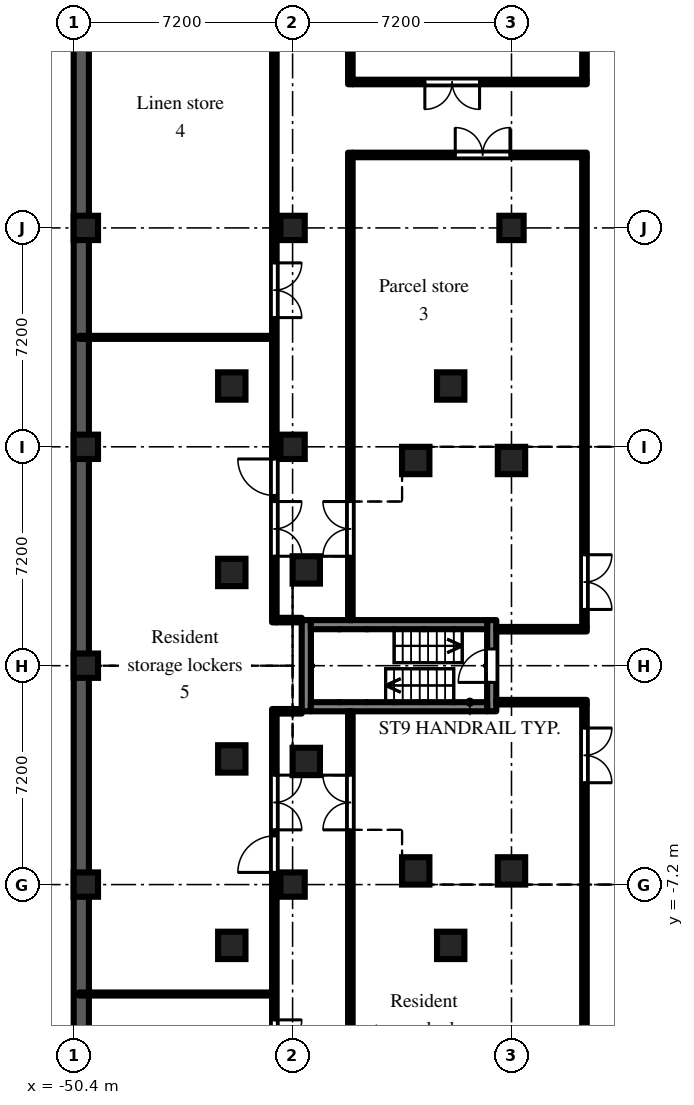
"""IFC4 building model, lengths in metres.
Left out: names, types, materials, properties, quantities, classifications, styles, units other than length and angle.
Written with IfcOpenShell. Run it as: python <this file> out.ifc"""

import sys

from ifc_helpers import new_model, si_unit, direction, frame, frame_2d, origin, origin_2d, place, context, subcontext, project, spatial, rectangle, extrude, element, fill, save


model = new_model("IFC4")
c1 = context("Model", 3, precision=1e-05, world=origin(), true_north=direction((0.0, 1.0)))
c2 = subcontext(c1, "Body", "Model", "MODEL_VIEW")
j1 = project(units=[si_unit("LENGTHUNIT", "METRE"), si_unit("PLANEANGLEUNIT", "RADIAN")], contexts=[c1])
p1 = place(None, origin())
s1 = spatial("IfcSite", under=j1, at=p1, CompositionType="ELEMENT")
p2 = place(p1, origin())
s2 = spatial("IfcBuilding", under=s1, at=p2, CompositionType="ELEMENT")
p3 = place(p2, frame((0.0, 0.0, -4.8)))
s3 = spatial("IfcBuildingStorey", under=s2, at=p3, CompositionType="ELEMENT", Elevation=-4.8)
p4 = place(p3, frame((-50.15, -49.9, -0.5), z_axis=(0.0, 0.0, 1.0), x_axis=(0.0, 1.0, 0.0)))
e1 = element("IfcWall", 1, at=p4, inside=s3, PredefinedType="SOLIDWALL", context=c2, shape_type="SweptSolid", body=[
    extrude(rectangle(XDim=99.8, YDim=0.5, at=frame_2d((49.9, 0.0))), origin(), (0.0, 0.0, 1.0), 5.3),
])
for number, where, z_axis, x_axis in (
    (2, (-42.75, -3.15, -0.5), (0.0, 0.0, 1.0), (1.0, 0.0, 0.0)),
    (3, (-42.75, 3.15, -0.5), (0.0, 0.0, 1.0), (1.0, 0.0, 0.0)),
    (4, (-39.15, -6.75, -0.5), (0.0, 0.0, 1.0), (1.0, 0.0, 0.0)),
    (5, (-39.15, 6.75, -0.5), (0.0, 0.0, 1.0), (1.0, 0.0, 0.0)),
    (6, (-36.0, -6.75, -0.5), (0.0, 0.0, 1.0), (1.0, 0.0, 0.0)),
    (7, (-36.0, 6.75, -0.5), (0.0, 0.0, 1.0), (1.0, 0.0, 0.0)),
):
    element("IfcColumn", number, at=place(p3, frame(where, z_axis=z_axis, x_axis=x_axis)), inside=s3, PredefinedType="COLUMN", context=c2, shape_type="SweptSolid", body=[
        extrude(rectangle(XDim=0.9, YDim=0.9, at=origin_2d()), origin(), (0.0, 0.0, 1.0), 5.3),
    ])
for number, where, z_axis, x_axis in (
    (8, (-50.0, -7.2, -0.5), (0.0, 0.0, 1.0), (1.0, 0.0, 0.0)),
    (9, (-50.0, 0.0, -0.5), (0.0, 0.0, 1.0), (1.0, 0.0, 0.0)),
    (10, (-50.0, 7.2, -0.5), (0.0, 0.0, 1.0), (1.0, 0.0, 0.0)),
    (11, (-50.0, 14.4, -0.5), (0.0, 0.0, 1.0), (1.0, 0.0, 0.0)),
    (12, (-43.2, -7.2, -0.5), (0.0, 0.0, 1.0), (1.0, 0.0, 0.0)),
    (13, (-43.2, 7.2, -0.5), (0.0, 0.0, 1.0), (1.0, 0.0, 0.0)),
    (14, (-43.2, 14.4, -0.5), (0.0, 0.0, 1.0), (1.0, 0.0, 0.0)),
    (15, (-36.0, 14.4, -0.5), (0.0, 0.0, 1.0), (1.0, 0.0, 0.0)),
):
    element("IfcColumn", number, at=place(p3, frame(where, z_axis=z_axis, x_axis=x_axis)), inside=s3, PredefinedType="COLUMN", context=c2, shape_type="SweptSolid", body=[
        extrude(rectangle(XDim=0.8, YDim=0.8, at=origin_2d()), origin(), (0.0, 0.0, 1.0), 5.3),
    ])
for number, where, z_axis, x_axis in (
    (16, (-45.2, -9.2, -0.5), (0.0, 0.0, 1.0), (1.0, 0.0, 0.0)),
    (17, (-45.2, -3.067, -0.5), (0.0, 0.0, 1.0), (1.0, 0.0, 0.0)),
    (18, (-45.2, 3.067, -0.5), (0.0, 0.0, 1.0), (1.0, 0.0, 0.0)),
    (19, (-45.2, 9.2, -0.5), (0.0, 0.0, 1.0), (1.0, 0.0, 0.0)),
    (20, (-38.0, -9.2, -0.5), (0.0, 0.0, 1.0), (1.0, 0.0, 0.0)),
    (21, (-38.0, 9.2, -0.5), (0.0, 0.0, 1.0), (1.0, 0.0, 0.0)),
):
    element("IfcColumn", number, at=place(p3, frame(where, z_axis=z_axis, x_axis=x_axis)), inside=s3, PredefinedType="COLUMN", context=c2, shape_type="SweptSolid", body=[
        extrude(rectangle(XDim=0.9, YDim=0.9, at=origin_2d()), origin(), (0.0, 0.0, 1.0), 5.3),
    ])
p5 = place(p3, frame((-36.65, -1.5, 0.0), z_axis=(0.0, 0.0, 1.0), x_axis=(0.0, 1.0, 0.0)))
e22 = element("IfcWall", 22, at=p5, inside=s3, PredefinedType="SHEAR", context=c2, shape_type="SweptSolid", body=[
    extrude(rectangle(XDim=3.0, YDim=0.3, at=frame_2d((1.5, 0.0))), origin(), (0.0, 0.0, 1.0), 4.35),
])
p6 = place(p5, frame((0.95, 0.0, 0.0)))
e23 = element("IfcOpeningElement", 23, at=p6, cuts=e22, PredefinedType="OPENING", context=c2, shape_type="SweptSolid", body=[
    extrude(rectangle(XDim=1.1, YDim=2.1, at=frame_2d((0.55, 1.05))), frame((0.0, 0.16, 0.0), z_axis=(0.0, -1.0, 0.0), x_axis=(1.0, 0.0, 0.0)), (0.0, 0.0, 1.0), 0.32),
])
p7 = place(p3, frame((-42.75, -1.5, 0.0), z_axis=(0.0, 0.0, 1.0), x_axis=(0.0, 1.0, 0.0)))
e24 = element("IfcWall", 24, at=p7, inside=s3, PredefinedType="SHEAR", context=c2, shape_type="SweptSolid", body=[
    extrude(rectangle(XDim=3.0, YDim=0.3, at=frame_2d((1.5, 0.0))), origin(), (0.0, 0.0, 1.0), 4.35),
])
for number, where, z_axis, x_axis in (
    (25, (-36.8, -1.35, 0.0), (0.0, 0.0, 1.0), (-1.0, 0.0, 0.0)),
    (26, (-36.8, 1.35, 0.0), (0.0, 0.0, 1.0), (-1.0, 0.0, 0.0)),
):
    element("IfcWall", number, at=place(p3, frame(where, z_axis=z_axis, x_axis=x_axis)), inside=s3, PredefinedType="SHEAR", context=c2, shape_type="SweptSolid", body=[
        extrude(rectangle(XDim=5.8, YDim=0.3, at=frame_2d((2.9, 0.0))), origin(), (0.0, 0.0, 1.0), 4.35),
    ])
for number, where, z_axis, x_axis in (
    (27, (-50.22, -10.8, 0.0), (0.0, 0.0, 1.0), (1.0, 0.0, 0.0)),
    (28, (-50.22, 10.8, 0.0), (0.0, 0.0, 1.0), (1.0, 0.0, 0.0)),
):
    element("IfcWall", number, at=place(p3, frame(where, z_axis=z_axis, x_axis=x_axis)), inside=s3, PredefinedType="PARTITIONING", context=c2, shape_type="SweptSolid", body=[
        extrude(rectangle(XDim=6.345, YDim=0.1, at=frame_2d((3.172, 0.0))), origin(), (0.0, 0.0, 1.0), 4.35),
    ])
p8 = place(p3, frame((-43.8, -31.275, 0.0), z_axis=(0.0, 0.0, 1.0), x_axis=(0.0, 1.0, 0.0)))
e29 = element("IfcWall", 29, at=p8, inside=s3, PredefinedType="PARTITIONING", context=c2, shape_type="SweptSolid", body=[
    extrude(rectangle(XDim=29.85, YDim=0.15, at=frame_2d((14.925, 0.0))), origin(), (0.0, 0.0, 1.0), 4.35),
])
p9 = place(p8, frame((3.725, 0.0, 0.0)))
e30 = element("IfcOpeningElement", 30, at=p9, cuts=e29, PredefinedType="OPENING", context=c2, shape_type="SweptSolid", body=[
    extrude(rectangle(XDim=1.2, YDim=2.1, at=frame_2d((0.6, 1.05))), frame((0.0, 0.085, 0.0), z_axis=(0.0, -1.0, 0.0), x_axis=(1.0, 0.0, 0.0)), (0.0, 0.0, 1.0), 0.17),
])
p10 = place(p8, frame((24.475, 0.0, 0.0)))
e31 = element("IfcOpeningElement", 31, at=p10, cuts=e29, PredefinedType="OPENING", context=c2, shape_type="SweptSolid", body=[
    extrude(rectangle(XDim=1.2, YDim=2.1, at=frame_2d((0.6, 1.05))), frame((0.0, 0.085, 0.0), z_axis=(0.0, -1.0, 0.0), x_axis=(1.0, 0.0, 0.0)), (0.0, 0.0, 1.0), 0.17),
])
p11 = place(p8, frame((25.875, 0.0, 0.0)))
e32 = element("IfcOpeningElement", 32, at=p11, cuts=e29, PredefinedType="OPENING", context=c2, shape_type="SweptSolid", body=[
    extrude(rectangle(XDim=1.8, YDim=2.1, at=frame_2d((0.9, 1.05))), frame((0.0, 0.085, 0.0), z_axis=(0.0, -1.0, 0.0), x_axis=(1.0, 0.0, 0.0)), (0.0, 0.0, 1.0), 0.17),
])
p12 = place(p8, frame((6.725, 0.0, 0.0)))
e33 = element("IfcOpeningElement", 33, at=p12, cuts=e29, PredefinedType="OPENING", context=c2, shape_type="SweptSolid", body=[
    extrude(rectangle(XDim=1.8, YDim=2.1, at=frame_2d((0.9, 1.05))), frame((0.0, 0.085, 0.0), z_axis=(0.0, -1.0, 0.0), x_axis=(1.0, 0.0, 0.0)), (0.0, 0.0, 1.0), 0.17),
])
p13 = place(p8, frame((17.825, 0.0, 0.0)))
e34 = element("IfcOpeningElement", 34, at=p13, cuts=e29, PredefinedType="OPENING", context=c2, shape_type="SweptSolid", body=[
    extrude(rectangle(XDim=1.8, YDim=2.1, at=frame_2d((0.9, 1.05))), frame((0.0, 0.085, 0.0), z_axis=(0.0, -1.0, 0.0), x_axis=(1.0, 0.0, 0.0)), (0.0, 0.0, 1.0), 0.17),
])
p14 = place(p3, frame((-43.725, -1.5, 0.0), z_axis=(0.0, 0.0, 1.0), x_axis=(1.0, 0.0, 0.0)))
e35 = element("IfcWall", 35, at=p14, inside=s3, PredefinedType="PARTITIONING", context=c2, shape_type="SweptSolid", body=[
    extrude(rectangle(XDim=0.825, YDim=0.15, at=frame_2d((0.413, 0.0))), origin(), (0.0, 0.0, 1.0), 4.35),
])
p15 = place(p3, frame((-43.8, 1.425, 0.0), z_axis=(0.0, 0.0, 1.0), x_axis=(0.0, 1.0, 0.0)))
e36 = element("IfcWall", 36, at=p15, inside=s3, PredefinedType="PARTITIONING", context=c2, shape_type="SweptSolid", body=[
    extrude(rectangle(XDim=29.85, YDim=0.15, at=frame_2d((14.925, 0.0))), origin(), (0.0, 0.0, 1.0), 4.35),
])
p16 = place(p15, frame((24.425, 0.0, 0.0)))
e37 = element("IfcOpeningElement", 37, at=p16, cuts=e36, PredefinedType="OPENING", context=c2, shape_type="SweptSolid", body=[
    extrude(rectangle(XDim=1.8, YDim=2.1, at=frame_2d((0.9, 1.05))), frame((0.0, 0.085, 0.0), z_axis=(0.0, -1.0, 0.0), x_axis=(1.0, 0.0, 0.0)), (0.0, 0.0, 1.0), 0.17),
])
p17 = place(p15, frame((10.025, 0.0, 0.0)))
e38 = element("IfcOpeningElement", 38, at=p17, cuts=e36, PredefinedType="OPENING", context=c2, shape_type="SweptSolid", body=[
    extrude(rectangle(XDim=1.8, YDim=2.1, at=frame_2d((0.9, 1.05))), frame((0.0, 0.085, 0.0), z_axis=(0.0, -1.0, 0.0), x_axis=(1.0, 0.0, 0.0)), (0.0, 0.0, 1.0), 0.17),
])
p18 = place(p15, frame((21.125, 0.0, 0.0)))
e39 = element("IfcOpeningElement", 39, at=p18, cuts=e36, PredefinedType="OPENING", context=c2, shape_type="SweptSolid", body=[
    extrude(rectangle(XDim=1.8, YDim=2.1, at=frame_2d((0.9, 1.05))), frame((0.0, 0.085, 0.0), z_axis=(0.0, -1.0, 0.0), x_axis=(1.0, 0.0, 0.0)), (0.0, 0.0, 1.0), 0.17),
])
p19 = place(p15, frame((2.175, 0.0, 0.0)))
e40 = element("IfcOpeningElement", 40, at=p19, cuts=e36, PredefinedType="OPENING", context=c2, shape_type="SweptSolid", body=[
    extrude(rectangle(XDim=1.8, YDim=2.1, at=frame_2d((0.9, 1.05))), frame((0.0, 0.085, 0.0), z_axis=(0.0, -1.0, 0.0), x_axis=(1.0, 0.0, 0.0)), (0.0, 0.0, 1.0), 0.17),
])
p20 = place(p15, frame((4.175, 0.0, 0.0)))
e41 = element("IfcOpeningElement", 41, at=p20, cuts=e36, PredefinedType="OPENING", context=c2, shape_type="SweptSolid", body=[
    extrude(rectangle(XDim=1.2, YDim=2.1, at=frame_2d((0.6, 1.05))), frame((0.0, 0.085, 0.0), z_axis=(0.0, -1.0, 0.0), x_axis=(1.0, 0.0, 0.0)), (0.0, 0.0, 1.0), 0.17),
])
p21 = place(p3, frame((-43.725, 1.5, 0.0), z_axis=(0.0, 0.0, 1.0), x_axis=(1.0, 0.0, 0.0)))
e42 = element("IfcWall", 42, at=p21, inside=s3, PredefinedType="PARTITIONING", context=c2, shape_type="SweptSolid", body=[
    extrude(rectangle(XDim=0.825, YDim=0.15, at=frame_2d((0.413, 0.0))), origin(), (0.0, 0.0, 1.0), 4.35),
])
p22 = place(p3, frame((-41.3, -16.875, 0.0), z_axis=(0.0, 0.0, 1.0), x_axis=(0.0, 1.0, 0.0)))
e43 = element("IfcWall", 43, at=p22, inside=s3, PredefinedType="PARTITIONING", context=c2, shape_type="SweptSolid", body=[
    extrude(rectangle(XDim=15.375, YDim=0.15, at=frame_2d((7.688, 0.0))), origin(), (0.0, 0.0, 1.0), 4.35),
])
p23 = place(p22, frame((11.475, 0.0, 0.0)))
e44 = element("IfcOpeningElement", 44, at=p23, cuts=e43, PredefinedType="OPENING", context=c2, shape_type="SweptSolid", body=[
    extrude(rectangle(XDim=1.8, YDim=2.1, at=frame_2d((0.9, 1.05))), frame((0.0, 0.085, 0.0), z_axis=(0.0, -1.0, 0.0), x_axis=(1.0, 0.0, 0.0)), (0.0, 0.0, 1.0), 0.17),
])
p24 = place(p3, frame((-41.3, 1.5, 0.0), z_axis=(0.0, 0.0, 1.0), x_axis=(0.0, 1.0, 0.0)))
e45 = element("IfcWall", 45, at=p24, inside=s3, PredefinedType="PARTITIONING", context=c2, shape_type="SweptSolid", body=[
    extrude(rectangle(XDim=15.375, YDim=0.15, at=frame_2d((7.688, 0.0))), origin(), (0.0, 0.0, 1.0), 4.35),
])
p25 = place(p24, frame((2.1, 0.0, 0.0)))
e46 = element("IfcOpeningElement", 46, at=p25, cuts=e45, PredefinedType="OPENING", context=c2, shape_type="SweptSolid", body=[
    extrude(rectangle(XDim=1.8, YDim=2.1, at=frame_2d((0.9, 1.05))), frame((0.0, 0.085, 0.0), z_axis=(0.0, -1.0, 0.0), x_axis=(1.0, 0.0, 0.0)), (0.0, 0.0, 1.0), 0.17),
])
p26 = place(p3, frame((-41.225, 16.8, 0.0), z_axis=(0.0, 0.0, 1.0), x_axis=(1.0, 0.0, 0.0)))
e47 = element("IfcWall", 47, at=p26, inside=s3, PredefinedType="PARTITIONING", context=c2, shape_type="SweptSolid", body=[
    extrude(rectangle(XDim=7.7, YDim=0.15, at=frame_2d((3.85, 0.0))), origin(), (0.0, 0.0, 1.0), 4.35),
])
p27 = place(p26, frame((3.375, 0.0, 0.0)))
e48 = element("IfcOpeningElement", 48, at=p27, cuts=e47, PredefinedType="OPENING", context=c2, shape_type="SweptSolid", body=[
    extrude(rectangle(XDim=1.8, YDim=2.1, at=frame_2d((0.9, 1.05))), frame((0.0, 0.085, 0.0), z_axis=(0.0, -1.0, 0.0), x_axis=(1.0, 0.0, 0.0)), (0.0, 0.0, 1.0), 0.17),
])
p28 = place(p3, frame((-41.3, 19.125, 0.0), z_axis=(0.0, 0.0, 1.0), x_axis=(0.0, 1.0, 0.0)))
e49 = element("IfcWall", 49, at=p28, inside=s3, PredefinedType="PARTITIONING", context=c2, shape_type="SweptSolid", body=[
    extrude(rectangle(XDim=12.15, YDim=0.15, at=frame_2d((6.075, 0.0))), origin(), (0.0, 0.0, 1.0), 4.35),
])
p29 = place(p3, frame((-41.225, 19.2, 0.0), z_axis=(0.0, 0.0, 1.0), x_axis=(1.0, 0.0, 0.0)))
e50 = element("IfcWall", 50, at=p29, inside=s3, PredefinedType="PARTITIONING", context=c2, shape_type="SweptSolid", body=[
    extrude(rectangle(XDim=7.7, YDim=0.15, at=frame_2d((3.85, 0.0))), origin(), (0.0, 0.0, 1.0), 4.35),
])
p30 = place(p29, frame((2.375, 0.0, 0.0)))
e51 = element("IfcOpeningElement", 51, at=p30, cuts=e50, PredefinedType="OPENING", context=c2, shape_type="SweptSolid", body=[
    extrude(rectangle(XDim=1.8, YDim=2.1, at=frame_2d((0.9, 1.05))), frame((0.0, 0.085, 0.0), z_axis=(0.0, -1.0, 0.0), x_axis=(1.0, 0.0, 0.0)), (0.0, 0.0, 1.0), 0.17),
])
for number, where, z_axis, x_axis in (
    (52, (-36.5, -1.2, 0.0), (0.0, 0.0, 1.0), (1.0, 0.0, 0.0)),
    (53, (-36.5, 1.2, 0.0), (0.0, 0.0, 1.0), (1.0, 0.0, 0.0)),
):
    element("IfcWall", number, at=place(p3, frame(where, z_axis=z_axis, x_axis=x_axis)), inside=s3, PredefinedType="PARTITIONING", context=c2, shape_type="SweptSolid", body=[
        extrude(rectangle(XDim=2.975, YDim=0.15, at=frame_2d((1.488, 0.0))), origin(), (0.0, 0.0, 1.0), 4.35),
    ])
p31 = place(p3, frame((-33.6, -16.725, 0.0), z_axis=(0.0, 0.0, 1.0), x_axis=(0.0, 1.0, 0.0)))
e54 = element("IfcWall", 54, at=p31, inside=s3, PredefinedType="PARTITIONING", context=c2, shape_type="SweptSolid", body=[
    extrude(rectangle(XDim=15.45, YDim=0.15, at=frame_2d((7.725, 0.0))), origin(), (0.0, 0.0, 1.0), 4.35),
])
p32 = place(p31, frame((12.875, 0.0, 0.0)))
e55 = element("IfcOpeningElement", 55, at=p32, cuts=e54, PredefinedType="OPENING", context=c2, shape_type="SweptSolid", body=[
    extrude(rectangle(XDim=1.8, YDim=2.1, at=frame_2d((0.9, 1.05))), frame((0.0, 0.085, 0.0), z_axis=(0.0, -1.0, 0.0), x_axis=(1.0, 0.0, 0.0)), (0.0, 0.0, 1.0), 0.17),
])
p33 = place(p3, frame((-33.6, 1.275, 0.0), z_axis=(0.0, 0.0, 1.0), x_axis=(0.0, 1.0, 0.0)))
e56 = element("IfcWall", 56, at=p33, inside=s3, PredefinedType="PARTITIONING", context=c2, shape_type="SweptSolid", body=[
    extrude(rectangle(XDim=15.45, YDim=0.15, at=frame_2d((7.725, 0.0))), origin(), (0.0, 0.0, 1.0), 4.35),
])
p34 = place(p33, frame((0.575, 0.0, 0.0)))
e57 = element("IfcOpeningElement", 57, at=p34, cuts=e56, PredefinedType="OPENING", context=c2, shape_type="SweptSolid", body=[
    extrude(rectangle(XDim=1.8, YDim=2.1, at=frame_2d((0.9, 1.05))), frame((0.0, 0.085, 0.0), z_axis=(0.0, -1.0, 0.0), x_axis=(1.0, 0.0, 0.0)), (0.0, 0.0, 1.0), 0.17),
])
p35 = place(p3, frame((-33.6, 19.275, 0.0), z_axis=(0.0, 0.0, 1.0), x_axis=(0.0, 1.0, 0.0)))
e58 = element("IfcWall", 58, at=p35, inside=s3, PredefinedType="PARTITIONING", context=c2, shape_type="SweptSolid", body=[
    extrude(rectangle(XDim=11.85, YDim=0.15, at=frame_2d((5.925, 0.0))), origin(), (0.0, 0.0, 1.0), 4.35),
])
p36 = place(p6, origin())
e59 = element("IfcDoor", 59, at=p36, inside=s3, OperationType="SINGLE_SWING_LEFT", PredefinedType="DOOR", context=c2, shape_type="SweptSolid", body=[
    extrude(rectangle(XDim=1.1, YDim=2.1, at=frame_2d((0.55, 1.05))), frame((0.0, 0.025, 0.0), z_axis=(0.0, -1.0, 0.0), x_axis=(1.0, 0.0, 0.0)), (0.0, 0.0, 1.0), 0.05),
])
fill(e23, e59)
p37 = place(p30, frame((1.8, 0.0, 0.0), z_axis=(0.0, 0.0, 1.0), x_axis=(-1.0, 0.0, 0.0)))
e60 = element("IfcDoor", 60, at=p37, inside=s3, OperationType="DOUBLE_DOOR_DOUBLE_SWING", PredefinedType="DOOR", context=c2, shape_type="SweptSolid", body=[
    extrude(rectangle(XDim=1.8, YDim=2.1, at=frame_2d((0.9, 1.05))), frame((0.0, 0.025, 0.0), z_axis=(0.0, -1.0, 0.0), x_axis=(1.0, 0.0, 0.0)), (0.0, 0.0, 1.0), 0.05),
])
fill(e51, e60)
p38 = place(p17, frame((1.8, 0.0, 0.0), z_axis=(0.0, 0.0, 1.0), x_axis=(-1.0, 0.0, 0.0)))
e61 = element("IfcDoor", 61, at=p38, inside=s3, OperationType="DOUBLE_DOOR_DOUBLE_SWING", PredefinedType="DOOR", context=c2, shape_type="SweptSolid", body=[
    extrude(rectangle(XDim=1.8, YDim=2.1, at=frame_2d((0.9, 1.05))), frame((0.0, 0.025, 0.0), z_axis=(0.0, -1.0, 0.0), x_axis=(1.0, 0.0, 0.0)), (0.0, 0.0, 1.0), 0.05),
])
fill(e38, e61)
p39 = place(p25, origin())
e62 = element("IfcDoor", 62, at=p39, inside=s3, OperationType="DOUBLE_DOOR_DOUBLE_SWING", PredefinedType="DOOR", context=c2, shape_type="SweptSolid", body=[
    extrude(rectangle(XDim=1.8, YDim=2.1, at=frame_2d((0.9, 1.05))), frame((0.0, 0.025, 0.0), z_axis=(0.0, -1.0, 0.0), x_axis=(1.0, 0.0, 0.0)), (0.0, 0.0, 1.0), 0.05),
])
fill(e46, e62)
p40 = place(p27, origin())
e63 = element("IfcDoor", 63, at=p40, inside=s3, OperationType="DOUBLE_DOOR_DOUBLE_SWING", PredefinedType="DOOR", context=c2, shape_type="SweptSolid", body=[
    extrude(rectangle(XDim=1.8, YDim=2.1, at=frame_2d((0.9, 1.05))), frame((0.0, 0.025, 0.0), z_axis=(0.0, -1.0, 0.0), x_axis=(1.0, 0.0, 0.0)), (0.0, 0.0, 1.0), 0.05),
])
fill(e48, e63)
p41 = place(p34, frame((1.8, 0.0, 0.0), z_axis=(0.0, 0.0, 1.0), x_axis=(-1.0, 0.0, 0.0)))
e64 = element("IfcDoor", 64, at=p41, inside=s3, OperationType="DOUBLE_DOOR_DOUBLE_SWING", PredefinedType="DOOR", context=c2, shape_type="SweptSolid", body=[
    extrude(rectangle(XDim=1.8, YDim=2.1, at=frame_2d((0.9, 1.05))), frame((0.0, 0.025, 0.0), z_axis=(0.0, -1.0, 0.0), x_axis=(1.0, 0.0, 0.0)), (0.0, 0.0, 1.0), 0.05),
])
fill(e57, e64)
p42 = place(p10, origin())
e65 = element("IfcDoor", 65, at=p42, inside=s3, OperationType="SINGLE_SWING_LEFT", PredefinedType="DOOR", context=c2, shape_type="SweptSolid", body=[
    extrude(rectangle(XDim=1.2, YDim=2.1, at=frame_2d((0.6, 1.05))), frame((0.0, 0.025, 0.0), z_axis=(0.0, -1.0, 0.0), x_axis=(1.0, 0.0, 0.0)), (0.0, 0.0, 1.0), 0.05),
])
fill(e31, e65)
p43 = place(p11, frame((1.8, 0.0, 0.0), z_axis=(0.0, 0.0, 1.0), x_axis=(-1.0, 0.0, 0.0)))
e66 = element("IfcDoor", 66, at=p43, inside=s3, OperationType="DOUBLE_DOOR_DOUBLE_SWING", PredefinedType="DOOR", context=c2, shape_type="SweptSolid", body=[
    extrude(rectangle(XDim=1.8, YDim=2.1, at=frame_2d((0.9, 1.05))), frame((0.0, 0.025, 0.0), z_axis=(0.0, -1.0, 0.0), x_axis=(1.0, 0.0, 0.0)), (0.0, 0.0, 1.0), 0.05),
])
fill(e32, e66)
p44 = place(p19, frame((1.8, 0.0, 0.0), z_axis=(0.0, 0.0, 1.0), x_axis=(-1.0, 0.0, 0.0)))
e67 = element("IfcDoor", 67, at=p44, inside=s3, OperationType="DOUBLE_DOOR_DOUBLE_SWING", PredefinedType="DOOR", context=c2, shape_type="SweptSolid", body=[
    extrude(rectangle(XDim=1.8, YDim=2.1, at=frame_2d((0.9, 1.05))), frame((0.0, 0.025, 0.0), z_axis=(0.0, -1.0, 0.0), x_axis=(1.0, 0.0, 0.0)), (0.0, 0.0, 1.0), 0.05),
])
fill(e40, e67)
p45 = place(p20, origin())
e68 = element("IfcDoor", 68, at=p45, inside=s3, OperationType="SINGLE_SWING_RIGHT", PredefinedType="DOOR", context=c2, shape_type="SweptSolid", body=[
    extrude(rectangle(XDim=1.2, YDim=2.1, at=frame_2d((0.6, 1.05))), frame((0.0, 0.025, 0.0), z_axis=(0.0, -1.0, 0.0), x_axis=(1.0, 0.0, 0.0)), (0.0, 0.0, 1.0), 0.05),
])
fill(e41, e68)
p46 = place(p23, origin())
e69 = element("IfcDoor", 69, at=p46, inside=s3, OperationType="DOUBLE_DOOR_DOUBLE_SWING", PredefinedType="DOOR", context=c2, shape_type="SweptSolid", body=[
    extrude(rectangle(XDim=1.8, YDim=2.1, at=frame_2d((0.9, 1.05))), frame((0.0, 0.025, 0.0), z_axis=(0.0, -1.0, 0.0), x_axis=(1.0, 0.0, 0.0)), (0.0, 0.0, 1.0), 0.05),
])
fill(e44, e69)
p47 = place(p32, frame((1.8, 0.0, 0.0), z_axis=(0.0, 0.0, 1.0), x_axis=(-1.0, 0.0, 0.0)))
e70 = element("IfcDoor", 70, at=p47, inside=s3, OperationType="DOUBLE_DOOR_DOUBLE_SWING", PredefinedType="DOOR", context=c2, shape_type="SweptSolid", body=[
    extrude(rectangle(XDim=1.8, YDim=2.1, at=frame_2d((0.9, 1.05))), frame((0.0, 0.025, 0.0), z_axis=(0.0, -1.0, 0.0), x_axis=(1.0, 0.0, 0.0)), (0.0, 0.0, 1.0), 0.05),
])
fill(e55, e70)
p48 = place(p13, frame((1.8, 0.0, 0.0), z_axis=(0.0, 0.0, 1.0), x_axis=(-1.0, 0.0, 0.0)))
e71 = element("IfcDoor", 71, at=p48, inside=s3, OperationType="DOUBLE_DOOR_DOUBLE_SWING", PredefinedType="DOOR", context=c2, shape_type="SweptSolid", body=[
    extrude(rectangle(XDim=1.8, YDim=2.1, at=frame_2d((0.9, 1.05))), frame((0.0, 0.025, 0.0), z_axis=(0.0, -1.0, 0.0), x_axis=(1.0, 0.0, 0.0)), (0.0, 0.0, 1.0), 0.05),
])
fill(e34, e71)
save(model, sys.argv[1])
